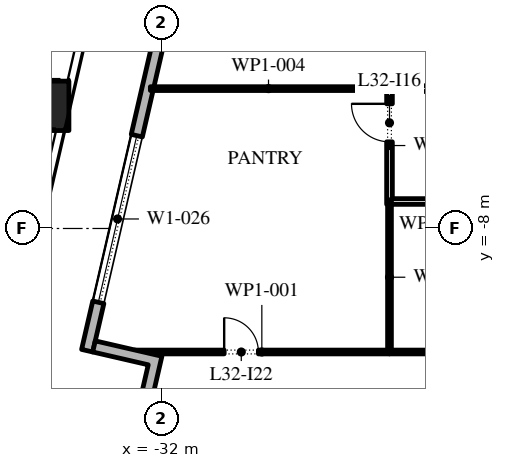
"""IFC4 building model, lengths in metres.
Left out: names, types, materials, properties, quantities, classifications, styles, units other than length and angle.
Written with IfcOpenShell. Run it as: python <this file> out.ifc"""

import sys

from ifc_helpers import new_model, si_unit, direction, frame, frame_2d, origin, origin_2d, place, context, subcontext, project, spatial, polyline, rectangle, outline, extrude, element, fill, save


model = new_model("IFC4")
c1 = context("Model", 3, precision=1e-05, world=origin(), true_north=direction((0.0, 1.0)))
c2 = subcontext(c1, "Body", "Model", "MODEL_VIEW")
j1 = project(units=[si_unit("LENGTHUNIT", "METRE"), si_unit("PLANEANGLEUNIT", "RADIAN")], contexts=[c1])
p1 = place(None, origin())
s1 = spatial("IfcSite", under=j1, at=p1, CompositionType="ELEMENT")
p2 = place(p1, origin())
s2 = spatial("IfcBuilding", under=s1, at=p2, CompositionType="ELEMENT")
p3 = place(p2, frame((0.0, 0.0, 147.6)))
s3 = spatial("IfcBuildingStorey", under=s2, at=p3, CompositionType="ELEMENT", Elevation=147.6)
p4 = place(p3, frame((-35.085, -4.773, 0.0), z_axis=(0.002906224189, 0.012671137464, 0.999915494498), x_axis=(-0.974691740237, 0.22355315143, 0.0)))
e1 = element("IfcColumn", 1, at=p4, inside=s3, PredefinedType="COLUMN", context=c2, shape_type="SweptSolid", body=[
    extrude(rectangle(XDim=1.3, YDim=1.3, at=origin_2d()), origin(), (0.0, 0.0, 1.0), 4.2),
])
p5 = place(p3, frame((-22.82, 37.016, 0.0), z_axis=(0.0, 0.0, 1.0), x_axis=(-0.224953880882, -0.974369412223, 0.0)))
e2 = element("IfcWall", 2, at=p5, inside=s3, PredefinedType="STANDARD", context=c2, shape_type="SweptSolid", body=[
    extrude(rectangle(XDim=49.5, YDim=0.3, at=frame_2d((24.75, 0.0))), origin(), (0.0, 0.0, 1.0), 4.0),
])
p6 = place(p5, frame((1.157, 0.0, 0.45)))
e3 = element("IfcOpeningElement", 3, at=p6, cuts=e2, PredefinedType="OPENING", context=c2, shape_type="SweptSolid", body=[
    extrude(rectangle(XDim=4.5, YDim=3.05, at=frame_2d((2.25, 1.525))), frame((0.0, 0.16, 0.0), z_axis=(0.0, -1.0, 0.0), x_axis=(1.0, 0.0, 0.0)), (0.0, 0.0, 1.0), 0.32),
])
p7 = place(p5, frame((8.121, 0.0, 0.45)))
e4 = element("IfcOpeningElement", 4, at=p7, cuts=e2, PredefinedType="OPENING", context=c2, shape_type="SweptSolid", body=[
    extrude(rectangle(XDim=4.5, YDim=3.05, at=frame_2d((2.25, 1.525))), frame((0.0, 0.16, 0.0), z_axis=(0.0, -1.0, 0.0), x_axis=(1.0, 0.0, 0.0)), (0.0, 0.0, 1.0), 0.32),
])
p8 = place(p5, frame((15.236, 0.0, 0.45)))
e5 = element("IfcOpeningElement", 5, at=p8, cuts=e2, PredefinedType="OPENING", context=c2, shape_type="SweptSolid", body=[
    extrude(rectangle(XDim=4.5, YDim=3.05, at=frame_2d((2.25, 1.525))), frame((0.0, 0.16, 0.0), z_axis=(0.0, -1.0, 0.0), x_axis=(1.0, 0.0, 0.0)), (0.0, 0.0, 1.0), 0.32),
])
p9 = place(p5, frame((23.4, 0.0, 0.0)))
e6 = element("IfcOpeningElement", 6, at=p9, cuts=e2, PredefinedType="OPENING", context=c2, shape_type="SweptSolid", body=[
    extrude(rectangle(XDim=2.4, YDim=3.5, at=frame_2d((1.2, 1.75))), frame((0.0, 0.16, 0.0), z_axis=(0.0, -1.0, 0.0), x_axis=(1.0, 0.0, 0.0)), (0.0, 0.0, 1.0), 0.32),
])
p10 = place(p5, frame((29.464, 0.0, 0.45)))
e7 = element("IfcOpeningElement", 7, at=p10, cuts=e2, PredefinedType="OPENING", context=c2, shape_type="SweptSolid", body=[
    extrude(rectangle(XDim=4.5, YDim=2.875, at=frame_2d((2.25, 1.438))), frame((0.0, 0.16, 0.0), z_axis=(0.0, -1.0, 0.0), x_axis=(1.0, 0.0, 0.0)), (0.0, 0.0, 1.0), 0.32),
])
p11 = place(p5, frame((36.579, 0.0, 0.45)))
e8 = element("IfcOpeningElement", 8, at=p11, cuts=e2, PredefinedType="OPENING", context=c2, shape_type="SweptSolid", body=[
    extrude(rectangle(XDim=4.5, YDim=2.675, at=frame_2d((2.25, 1.337))), frame((0.0, 0.16, 0.0), z_axis=(0.0, -1.0, 0.0), x_axis=(1.0, 0.0, 0.0)), (0.0, 0.0, 1.0), 0.32),
])
p12 = place(p5, frame((43.693, 0.0, 0.45)))
e9 = element("IfcOpeningElement", 9, at=p12, cuts=e2, PredefinedType="OPENING", context=c2, shape_type="SweptSolid", body=[
    extrude(rectangle(XDim=4.5, YDim=3.05, at=frame_2d((2.25, 1.525))), frame((0.0, 0.16, 0.0), z_axis=(0.0, -1.0, 0.0), x_axis=(1.0, 0.0, 0.0)), (0.0, 0.0, 1.0), 0.32),
])
p13 = place(p3, origin())
e10 = element("IfcWall", 10, at=p13, inside=s3, PredefinedType="STANDARD", context=c2, shape_type="SweptSolid", body=[
    extrude(outline(polyline([(-32.393, -13.116), (-30.639, -13.521), (-31.111, -15.567), (-31.404, -15.5), (-30.999, -13.746), (-32.753, -13.341), (-32.348, -11.587), (-33.809, -11.25), (-33.742, -10.957), (-31.988, -11.362), (-32.393, -13.116)])), origin(), (0.0, 0.0, 1.0), 4.0),
])
p14 = place(p3, frame((-26.0, -11.25, 0.0), z_axis=(0.0, 0.0, 1.0), x_axis=(-1.0, 0.0, 0.0)))
e11 = element("IfcWall", 11, at=p14, inside=s3, PredefinedType="PARTITIONING", context=c2, shape_type="SweptSolid", body=[
    extrude(rectangle(XDim=6.718, YDim=0.1, at=frame_2d((3.359, 0.0))), origin(), (0.0, 0.0, 1.0), 4.0),
])
p15 = place(p14, frame((3.45, 0.0, 0.0)))
e12 = element("IfcOpeningElement", 12, at=p15, cuts=e11, PredefinedType="OPENING", context=c2, shape_type="SweptSolid", body=[
    extrude(rectangle(XDim=0.9, YDim=2.1, at=frame_2d((0.45, 1.05))), frame((0.0, 0.06, 0.0), z_axis=(0.0, -1.0, 0.0), x_axis=(1.0, 0.0, 0.0)), (0.0, 0.0, 1.0), 0.12),
])
p16 = place(p3, frame((-26.0, -11.2, 0.0), z_axis=(0.0, 0.0, 1.0), x_axis=(0.0, 1.0, 0.0)))
e13 = element("IfcWall", 13, at=p16, inside=s3, PredefinedType="PARTITIONING", context=c2, shape_type="SweptSolid", body=[
    extrude(rectangle(XDim=3.835, YDim=0.1, at=frame_2d((1.917, 0.0))), origin(), (0.0, 0.0, 1.0), 4.0),
])
p17 = place(p3, frame((-26.0, -7.365, 0.0), z_axis=(0.0, 0.0, 1.0), x_axis=(0.0, 1.0, 0.0)))
e14 = element("IfcWall", 14, at=p17, inside=s3, PredefinedType="PARTITIONING", context=c2, shape_type="SweptSolid", body=[
    extrude(rectangle(XDim=3.095, YDim=0.15, at=frame_2d((1.547, 0.0))), origin(), (0.0, 0.0, 1.0), 4.0),
])
p18 = place(p17, frame((1.645, 0.0, 0.0)))
e15 = element("IfcOpeningElement", 15, at=p18, cuts=e14, PredefinedType="OPENING", context=c2, shape_type="SweptSolid", body=[
    extrude(rectangle(XDim=1.0, YDim=2.1, at=frame_2d((0.5, 1.05))), frame((0.0, 0.085, 0.0), z_axis=(0.0, -1.0, 0.0), x_axis=(1.0, 0.0, 0.0)), (0.0, 0.0, 1.0), 0.17),
])
p19 = place(p3, frame((-26.075, -4.32, 0.0), z_axis=(0.0, 0.0, 1.0), x_axis=(-1.0, 0.0, 0.0)))
e16 = element("IfcWall", 16, at=p19, inside=s3, PredefinedType="PARTITIONING", context=c2, shape_type="SweptSolid", body=[
    extrude(rectangle(XDim=6.217, YDim=0.1, at=frame_2d((3.108, 0.0))), origin(), (0.0, 0.0, 1.0), 4.0),
])
p20 = place(p3, frame((-25.925, -4.32, 0.0), z_axis=(0.0, 0.0, 1.0), x_axis=(1.0, 0.0, 0.0)))
e17 = element("IfcWall", 17, at=p20, inside=s3, PredefinedType="PARTITIONING", context=c2, shape_type="SweptSolid", body=[
    extrude(rectangle(XDim=2.4, YDim=0.15, at=frame_2d((1.2, 0.0))), origin(), (0.0, 0.0, 1.0), 4.0),
])
p21 = place(p3, frame((-23.6, -7.29, 0.0), z_axis=(0.0, 0.0, 1.0), x_axis=(-1.0, 0.0, 0.0)))
e18 = element("IfcWall", 18, at=p21, inside=s3, PredefinedType="PARTITIONING", context=c2, shape_type="SweptSolid", body=[
    extrude(rectangle(XDim=2.35, YDim=0.15, at=frame_2d((1.175, 0.0))), origin(), (0.0, 0.0, 1.0), 4.0),
])
p22 = place(p3, frame((-18.7, -11.25, 0.0), z_axis=(0.0, 0.0, 1.0), x_axis=(-1.0, 0.0, 0.0)))
e19 = element("IfcWall", 19, at=p22, inside=s3, PredefinedType="PARTITIONING", context=c2, shape_type="SweptSolid", body=[
    extrude(rectangle(XDim=7.3, YDim=0.1, at=frame_2d((3.65, 0.0))), origin(), (0.0, 0.0, 1.0), 4.0),
])
p23 = place(p12, origin())
e20 = element("IfcWindow", 20, at=p23, inside=s3, PartitioningType="DOUBLE_PANEL_VERTICAL", PredefinedType="WINDOW", context=c2, shape_type="SweptSolid", body=[
    extrude(rectangle(XDim=4.5, YDim=3.05, at=frame_2d((2.25, 1.525))), frame((0.0, 0.03, 0.0), z_axis=(0.0, -1.0, 0.0), x_axis=(1.0, 0.0, 0.0)), (0.0, 0.0, 1.0), 0.06),
])
fill(e9, e20)
p24 = place(p18, origin())
e21 = element("IfcDoor", 21, at=p24, inside=s3, OperationType="SINGLE_SWING_LEFT", PredefinedType="DOOR", context=c2, shape_type="SweptSolid", body=[
    extrude(rectangle(XDim=1.0, YDim=2.1, at=frame_2d((0.5, 1.05))), frame((0.0, 0.025, 0.0), z_axis=(0.0, -1.0, 0.0), x_axis=(1.0, 0.0, 0.0)), (0.0, 0.0, 1.0), 0.05),
])
fill(e15, e21)
p25 = place(p15, frame((0.9, 0.0, 0.0), z_axis=(0.0, 0.0, 1.0), x_axis=(-1.0, 0.0, 0.0)))
e22 = element("IfcDoor", 22, at=p25, inside=s3, OperationType="SINGLE_SWING_RIGHT", PredefinedType="DOOR", context=c2, shape_type="SweptSolid", body=[
    extrude(rectangle(XDim=0.9, YDim=2.1, at=frame_2d((0.45, 1.05))), frame((0.0, 0.025, 0.0), z_axis=(0.0, -1.0, 0.0), x_axis=(1.0, 0.0, 0.0)), (0.0, 0.0, 1.0), 0.05),
])
fill(e12, e22)
save(model, sys.argv[1])
